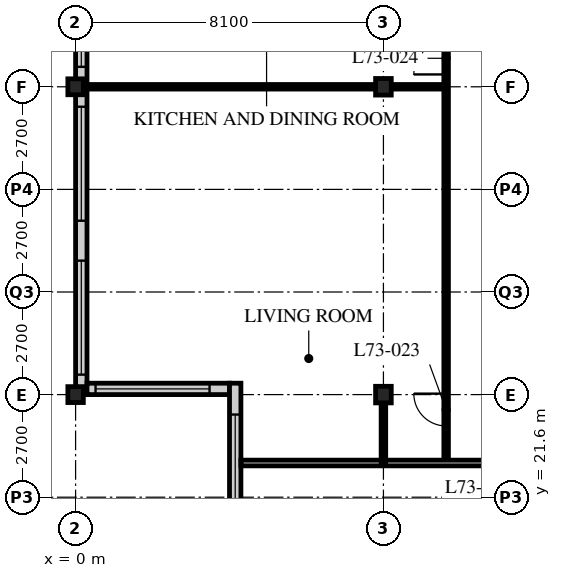
"""IFC4 building model, lengths in metres.
Left out: names, types, materials, properties, quantities, classifications, styles, units other than length and angle.
Written with IfcOpenShell. Run it as: python <this file> out.ifc"""

import sys

from ifc_helpers import new_model, si_unit, direction, frame, frame_2d, origin, origin_2d, place, context, subcontext, project, spatial, rectangle, i_section, extrude, element, fill, save


model = new_model("IFC4")
c1 = context("Model", 3, precision=1e-05, world=origin(), true_north=direction((0.0, 1.0)))
c2 = subcontext(c1, "Body", "Model", "MODEL_VIEW")
j1 = project(units=[si_unit("LENGTHUNIT", "METRE"), si_unit("PLANEANGLEUNIT", "RADIAN")], contexts=[c1])
p1 = place(None, origin())
s1 = spatial("IfcSite", under=j1, at=p1, CompositionType="ELEMENT")
p2 = place(p1, origin())
s2 = spatial("IfcBuilding", under=s1, at=p2, CompositionType="ELEMENT")
p3 = place(p2, frame((0.0, 0.0, 285.3)))
s3 = spatial("IfcBuildingStorey", under=s2, at=p3, CompositionType="ELEMENT", Elevation=285.3)
for number, where, z_axis, x_axis in (
    (1, (0.0, 24.3, 0.0), (0.0, 0.0, 1.0), (1.0, 0.0, 0.0)),
    (2, (0.0, 32.4, 0.0), (0.0, 0.0, 1.0), (1.0, 0.0, 0.0)),
):
    element("IfcColumn", number, at=place(p3, frame(where, z_axis=z_axis, x_axis=x_axis)), inside=s3, PredefinedType="COLUMN", context=c2, shape_type="SweptSolid", body=[
        extrude(i_section(OverallWidth=0.407, OverallDepth=0.419, WebThickness=0.031, FlangeThickness=0.049, FilletRadius=0.015, at=origin_2d()), origin(), (0.0, 0.0, 1.0), 3.9),
    ])
for number, where, z_axis, x_axis in (
    (3, (8.1, 24.3, 0.0), (0.0, 0.0, 1.0), (1.0, 0.0, 0.0)),
    (4, (8.1, 32.4, 0.0), (0.0, 0.0, 1.0), (1.0, 0.0, 0.0)),
):
    element("IfcColumn", number, at=place(p3, frame(where, z_axis=z_axis, x_axis=x_axis)), inside=s3, PredefinedType="COLUMN", context=c2, shape_type="SweptSolid", body=[
        extrude(i_section(OverallWidth=0.412, OverallDepth=0.437, WebThickness=0.036, FlangeThickness=0.058, FilletRadius=0.015, at=origin_2d()), origin(), (0.0, 0.0, 1.0), 3.9),
    ])
p4 = place(p3, frame((0.15, 56.4, 0.0), z_axis=(0.0, 0.0, 1.0), x_axis=(0.0, -1.0, 0.0)))
e5 = element("IfcWall", 5, at=p4, inside=s3, PredefinedType="SOLIDWALL", context=c2, shape_type="SweptSolid", body=[
    extrude(rectangle(XDim=32.1, YDim=0.3, at=frame_2d((16.05, 0.0))), origin(), (0.0, 0.0, 1.0), 3.69),
])
p5 = place(p4, frame((0.225, 0.0, 0.6)))
e6 = element("IfcOpeningElement", 6, at=p5, cuts=e5, PredefinedType="OPENING", context=c2, shape_type="SweptSolid", body=[
    extrude(rectangle(XDim=3.0, YDim=2.4, at=frame_2d((1.5, 1.2))), frame((0.0, 0.16, 0.0), z_axis=(0.0, -1.0, 0.0), x_axis=(1.0, 0.0, 0.0)), (0.0, 0.0, 1.0), 0.32),
])
p6 = place(p4, frame((4.275, 0.0, 0.6)))
e7 = element("IfcOpeningElement", 7, at=p6, cuts=e5, PredefinedType="OPENING", context=c2, shape_type="SweptSolid", body=[
    extrude(rectangle(XDim=3.0, YDim=2.4, at=frame_2d((1.5, 1.2))), frame((0.0, 0.16, 0.0), z_axis=(0.0, -1.0, 0.0), x_axis=(1.0, 0.0, 0.0)), (0.0, 0.0, 1.0), 0.32),
])
p7 = place(p4, frame((8.325, 0.0, 0.6)))
e8 = element("IfcOpeningElement", 8, at=p7, cuts=e5, PredefinedType="OPENING", context=c2, shape_type="SweptSolid", body=[
    extrude(rectangle(XDim=3.0, YDim=2.4, at=frame_2d((1.5, 1.2))), frame((0.0, 0.16, 0.0), z_axis=(0.0, -1.0, 0.0), x_axis=(1.0, 0.0, 0.0)), (0.0, 0.0, 1.0), 0.32),
])
p8 = place(p4, frame((12.375, 0.0, 0.6)))
e9 = element("IfcOpeningElement", 9, at=p8, cuts=e5, PredefinedType="OPENING", context=c2, shape_type="SweptSolid", body=[
    extrude(rectangle(XDim=3.0, YDim=2.4, at=frame_2d((1.5, 1.2))), frame((0.0, 0.16, 0.0), z_axis=(0.0, -1.0, 0.0), x_axis=(1.0, 0.0, 0.0)), (0.0, 0.0, 1.0), 0.32),
])
p9 = place(p4, frame((16.425, 0.0, 0.6)))
e10 = element("IfcOpeningElement", 10, at=p9, cuts=e5, PredefinedType="OPENING", context=c2, shape_type="SweptSolid", body=[
    extrude(rectangle(XDim=3.0, YDim=2.4, at=frame_2d((1.5, 1.2))), frame((0.0, 0.16, 0.0), z_axis=(0.0, -1.0, 0.0), x_axis=(1.0, 0.0, 0.0)), (0.0, 0.0, 1.0), 0.32),
])
p10 = place(p4, frame((20.475, 0.0, 0.6)))
e11 = element("IfcOpeningElement", 11, at=p10, cuts=e5, PredefinedType="OPENING", context=c2, shape_type="SweptSolid", body=[
    extrude(rectangle(XDim=3.0, YDim=2.4, at=frame_2d((1.5, 1.2))), frame((0.0, 0.16, 0.0), z_axis=(0.0, -1.0, 0.0), x_axis=(1.0, 0.0, 0.0)), (0.0, 0.0, 1.0), 0.32),
])
p11 = place(p4, frame((24.525, 0.0, 0.6)))
e12 = element("IfcOpeningElement", 12, at=p11, cuts=e5, PredefinedType="OPENING", context=c2, shape_type="SweptSolid", body=[
    extrude(rectangle(XDim=3.0, YDim=2.4, at=frame_2d((1.5, 1.2))), frame((0.0, 0.16, 0.0), z_axis=(0.0, -1.0, 0.0), x_axis=(1.0, 0.0, 0.0)), (0.0, 0.0, 1.0), 0.32),
])
p12 = place(p4, frame((28.575, 0.0, 0.6)))
e13 = element("IfcOpeningElement", 13, at=p12, cuts=e5, PredefinedType="OPENING", context=c2, shape_type="SweptSolid", body=[
    extrude(rectangle(XDim=3.0, YDim=2.4, at=frame_2d((1.5, 1.2))), frame((0.0, 0.16, 0.0), z_axis=(0.0, -1.0, 0.0), x_axis=(1.0, 0.0, 0.0)), (0.0, 0.0, 1.0), 0.32),
])
p13 = place(p3, frame((0.3, 24.45, 0.0), z_axis=(0.0, 0.0, 1.0), x_axis=(1.0, 0.0, 0.0)))
e14 = element("IfcWall", 14, at=p13, inside=s3, PredefinedType="SOLIDWALL", context=c2, shape_type="SweptSolid", body=[
    extrude(rectangle(XDim=3.75, YDim=0.3, at=frame_2d((1.875, 0.0))), origin(), (0.0, 0.0, 1.0), 3.69),
])
p14 = place(p13, frame((0.225, 0.0, 0.6)))
e15 = element("IfcOpeningElement", 15, at=p14, cuts=e14, PredefinedType="OPENING", context=c2, shape_type="SweptSolid", body=[
    extrude(rectangle(XDim=3.0, YDim=2.3, at=frame_2d((1.5, 1.15))), frame((0.0, 0.16, 0.0), z_axis=(0.0, -1.0, 0.0), x_axis=(1.0, 0.0, 0.0)), (0.0, 0.0, 1.0), 0.32),
])
p15 = place(p3, frame((4.2, 24.6, 0.0), z_axis=(0.0, 0.0, 1.0), x_axis=(0.0, -1.0, 0.0)))
e16 = element("IfcWall", 16, at=p15, inside=s3, PredefinedType="SOLIDWALL", context=c2, shape_type="SweptSolid", body=[
    extrude(rectangle(XDim=4.35, YDim=0.3, at=frame_2d((2.175, 0.0))), origin(), (0.0, 0.0, 1.0), 3.69),
])
p16 = place(p15, frame((0.825, 0.0, 0.6)))
e17 = element("IfcOpeningElement", 17, at=p16, cuts=e16, PredefinedType="OPENING", context=c2, shape_type="SweptSolid", body=[
    extrude(rectangle(XDim=3.0, YDim=2.3, at=frame_2d((1.5, 1.15))), frame((0.0, 0.16, 0.0), z_axis=(0.0, -1.0, 0.0), x_axis=(1.0, 0.0, 0.0)), (0.0, 0.0, 1.0), 0.32),
])
p17 = place(p3, frame((9.75, 22.5, 0.0), z_axis=(0.0, 0.0, 1.0), x_axis=(0.0, 1.0, 0.0)))
e18 = element("IfcWall", 18, at=p17, inside=s3, PredefinedType="PARTITIONING", context=c2, shape_type="SweptSolid", body=[
    extrude(rectangle(XDim=26.1, YDim=0.12, at=frame_2d((13.05, 0.0))), origin(), (0.0, 0.0, 1.0), 3.69),
])
p18 = place(p17, frame((0.975, 0.0, 0.0)))
e19 = element("IfcOpeningElement", 19, at=p18, cuts=e18, PredefinedType="OPENING", context=c2, shape_type="SweptSolid", body=[
    extrude(rectangle(XDim=0.85, YDim=2.1, at=frame_2d((0.425, 1.05))), frame((0.0, 0.07, 0.0), z_axis=(0.0, -1.0, 0.0), x_axis=(1.0, 0.0, 0.0)), (0.0, 0.0, 1.0), 0.14),
])
p19 = place(p17, frame((10.225, 0.0, 0.0)))
e20 = element("IfcOpeningElement", 20, at=p19, cuts=e18, PredefinedType="OPENING", context=c2, shape_type="SweptSolid", body=[
    extrude(rectangle(XDim=0.85, YDim=2.1, at=frame_2d((0.425, 1.05))), frame((0.0, 0.07, 0.0), z_axis=(0.0, -1.0, 0.0), x_axis=(1.0, 0.0, 0.0)), (0.0, 0.0, 1.0), 0.14),
])
p20 = place(p17, frame((14.275, 0.0, 0.0)))
e21 = element("IfcOpeningElement", 21, at=p20, cuts=e18, PredefinedType="OPENING", context=c2, shape_type="SweptSolid", body=[
    extrude(rectangle(XDim=0.85, YDim=2.1, at=frame_2d((0.425, 1.05))), frame((0.0, 0.07, 0.0), z_axis=(0.0, -1.0, 0.0), x_axis=(1.0, 0.0, 0.0)), (0.0, 0.0, 1.0), 0.14),
])
p21 = place(p17, frame((18.325, 0.0, 0.0)))
e22 = element("IfcOpeningElement", 22, at=p21, cuts=e18, PredefinedType="OPENING", context=c2, shape_type="SweptSolid", body=[
    extrude(rectangle(XDim=0.85, YDim=2.1, at=frame_2d((0.425, 1.05))), frame((0.0, 0.07, 0.0), z_axis=(0.0, -1.0, 0.0), x_axis=(1.0, 0.0, 0.0)), (0.0, 0.0, 1.0), 0.14),
])
p22 = place(p17, frame((22.375, 0.0, 0.0)))
e23 = element("IfcOpeningElement", 23, at=p22, cuts=e18, PredefinedType="OPENING", context=c2, shape_type="SweptSolid", body=[
    extrude(rectangle(XDim=0.85, YDim=2.1, at=frame_2d((0.425, 1.05))), frame((0.0, 0.07, 0.0), z_axis=(0.0, -1.0, 0.0), x_axis=(1.0, 0.0, 0.0)), (0.0, 0.0, 1.0), 0.14),
])
p23 = place(p3, frame((9.75, 32.4, 0.0), z_axis=(0.0, 0.0, 1.0), x_axis=(-1.0, 0.0, 0.0)))
e24 = element("IfcWall", 24, at=p23, inside=s3, PredefinedType="PARTITIONING", context=c2, shape_type="SweptSolid", body=[
    extrude(rectangle(XDim=9.45, YDim=0.12, at=frame_2d((4.725, 0.0))), origin(), (0.0, 0.0, 1.0), 3.078),
])
p24 = place(p3, frame((4.35, 22.5, 0.0), z_axis=(0.0, 0.0, 1.0), x_axis=(1.0, 0.0, 0.0)))
e25 = element("IfcWall", 25, at=p24, inside=s3, PredefinedType="PARTITIONING", context=c2, shape_type="SweptSolid", body=[
    extrude(rectangle(XDim=7.8, YDim=0.15, at=frame_2d((3.9, 0.0))), origin(), (0.0, 0.0, 1.0), 3.69),
])
p25 = place(p3, frame((8.1, 22.5, 0.0), z_axis=(0.0, 0.0, 1.0), x_axis=(0.0, 1.0, 0.0)))
e26 = element("IfcWall", 26, at=p25, inside=s3, PredefinedType="PARTITIONING", context=c2, shape_type="SweptSolid", body=[
    extrude(rectangle(XDim=1.597, YDim=0.12, at=frame_2d((0.798, 0.0))), origin(), (0.0, 0.0, 1.0), 3.078),
])
p26 = place(p10, origin())
e27 = element("IfcWindow", 27, at=p26, inside=s3, PartitioningType="SINGLE_PANEL", PredefinedType="WINDOW", context=c2, shape_type="SweptSolid", body=[
    extrude(rectangle(XDim=3.0, YDim=2.4, at=frame_2d((1.5, 1.2))), frame((0.0, 0.03, 0.0), z_axis=(0.0, -1.0, 0.0), x_axis=(1.0, 0.0, 0.0)), (0.0, 0.0, 1.0), 0.06),
])
fill(e11, e27)
p27 = place(p11, origin())
e28 = element("IfcWindow", 28, at=p27, inside=s3, PartitioningType="SINGLE_PANEL", PredefinedType="WINDOW", context=c2, shape_type="SweptSolid", body=[
    extrude(rectangle(XDim=3.0, YDim=2.4, at=frame_2d((1.5, 1.2))), frame((0.0, 0.03, 0.0), z_axis=(0.0, -1.0, 0.0), x_axis=(1.0, 0.0, 0.0)), (0.0, 0.0, 1.0), 0.06),
])
fill(e12, e28)
p28 = place(p12, origin())
e29 = element("IfcWindow", 29, at=p28, inside=s3, PartitioningType="SINGLE_PANEL", PredefinedType="WINDOW", context=c2, shape_type="SweptSolid", body=[
    extrude(rectangle(XDim=3.0, YDim=2.4, at=frame_2d((1.5, 1.2))), frame((0.0, 0.03, 0.0), z_axis=(0.0, -1.0, 0.0), x_axis=(1.0, 0.0, 0.0)), (0.0, 0.0, 1.0), 0.06),
])
fill(e13, e29)
p29 = place(p14, origin())
e30 = element("IfcWindow", 30, at=p29, inside=s3, PartitioningType="SINGLE_PANEL", PredefinedType="WINDOW", context=c2, shape_type="SweptSolid", body=[
    extrude(rectangle(XDim=3.0, YDim=2.3, at=frame_2d((1.5, 1.15))), frame((0.0, 0.03, 0.0), z_axis=(0.0, -1.0, 0.0), x_axis=(1.0, 0.0, 0.0)), (0.0, 0.0, 1.0), 0.06),
])
fill(e15, e30)
p30 = place(p16, origin())
e31 = element("IfcWindow", 31, at=p30, inside=s3, PartitioningType="SINGLE_PANEL", PredefinedType="WINDOW", context=c2, shape_type="SweptSolid", body=[
    extrude(rectangle(XDim=3.0, YDim=2.3, at=frame_2d((1.5, 1.15))), frame((0.0, 0.03, 0.0), z_axis=(0.0, -1.0, 0.0), x_axis=(1.0, 0.0, 0.0)), (0.0, 0.0, 1.0), 0.06),
])
fill(e17, e31)
p31 = place(p18, origin())
e32 = element("IfcDoor", 32, at=p31, inside=s3, OperationType="SINGLE_SWING_RIGHT", PredefinedType="DOOR", context=c2, shape_type="SweptSolid", body=[
    extrude(rectangle(XDim=0.85, YDim=2.1, at=frame_2d((0.425, 1.05))), frame((0.0, 0.025, 0.0), z_axis=(0.0, -1.0, 0.0), x_axis=(1.0, 0.0, 0.0)), (0.0, 0.0, 1.0), 0.05),
])
fill(e19, e32)
p32 = place(p19, origin())
e33 = element("IfcDoor", 33, at=p32, inside=s3, OperationType="SINGLE_SWING_LEFT", PredefinedType="DOOR", context=c2, shape_type="SweptSolid", body=[
    extrude(rectangle(XDim=0.85, YDim=2.1, at=frame_2d((0.425, 1.05))), frame((0.0, 0.025, 0.0), z_axis=(0.0, -1.0, 0.0), x_axis=(1.0, 0.0, 0.0)), (0.0, 0.0, 1.0), 0.05),
])
fill(e20, e33)
save(model, sys.argv[1])
